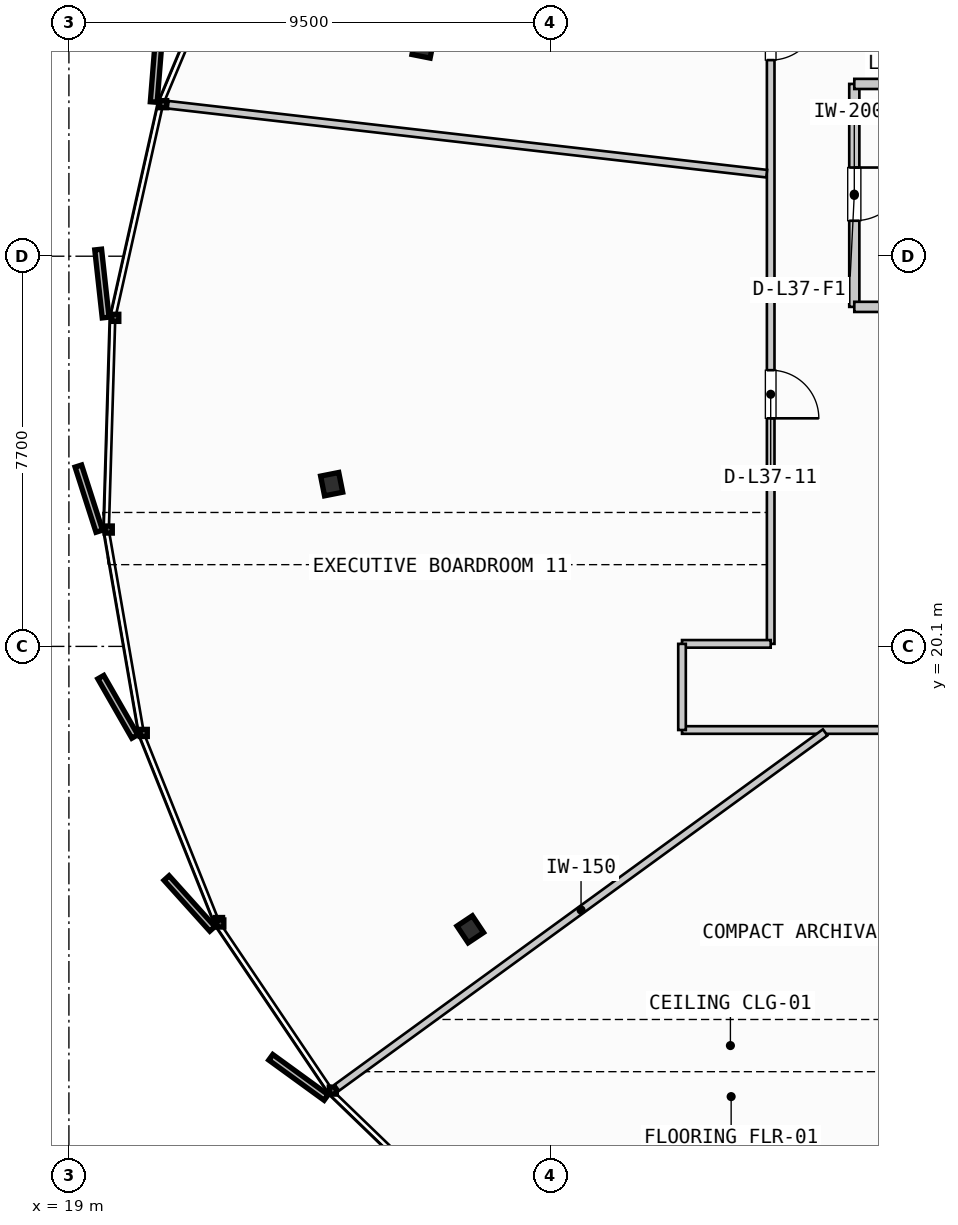
"""IFC4 building model, lengths in metres.
Left out: names, types, materials, properties, quantities, classifications, styles, units other than length and angle.
Written with IfcOpenShell. Run it as: python <this file> out.ifc"""

import sys

from ifc_helpers import new_model, si_unit, direction, frame, frame_2d, origin, origin_2d, place, context, subcontext, project, spatial, rectangle, i_section, extrude, source, transform, mapped, element, fill, save


model = new_model("IFC4")
c1 = context("Model", 3, precision=1e-05, world=origin(), true_north=direction((0.0, 1.0)))
c2 = subcontext(c1, "Body", "Model", "MODEL_VIEW")
j1 = project(units=[si_unit("LENGTHUNIT", "METRE"), si_unit("PLANEANGLEUNIT", "RADIAN")], contexts=[c1])
p1 = place(None, origin())
s1 = spatial("IfcSite", under=j1, at=p1, CompositionType="ELEMENT")
p2 = place(p1, origin())
s2 = spatial("IfcBuilding", under=s1, at=p2, CompositionType="ELEMENT")
p3 = place(p2, frame((0.0, 0.0, 146.55)))
s3 = spatial("IfcBuildingStorey", under=s2, at=p3, CompositionType="ELEMENT", Elevation=146.55)
m1 = source(origin(), c2, "Body", "SweptSolid", [
    extrude(i_section(OverallWidth=0.397, OverallDepth=0.365, WebThickness=0.028, FlangeThickness=0.044, FilletRadius=0.015, at=origin_2d()), origin(), (0.0, 0.0, 1.0), 3.3),
])
for number, where, z_axis, x_axis in (
    (1, (25.989, 31.94, 0.0), (0.0, 0.0, 1.0), (-0.981, 0.195, 0.0)),
    (2, (24.185, 23.302, 0.0), (0.0, 0.0, 1.0), (-0.981, -0.195, 0.0)),
    (3, (26.921, 14.517, 0.0), (0.0, 0.0, 1.0), (-0.831, -0.556, 0.0)),
):
    element("IfcColumn", number, at=place(p3, frame(where, z_axis=z_axis, x_axis=x_axis)), inside=s3, PredefinedType="COLUMN", context=c2, shape_type="MappedRepresentation", body=[
        mapped(m1, transform((0.0, 0.0, 0.0), scale=1.0)),
    ])
p4 = place(p3, frame((34.5, 31.2, 0.0), z_axis=(0.0, 0.0, 1.0), x_axis=(0.0, -1.0, 0.0)))
e4 = element("IfcWall", 4, at=p4, inside=s3, PredefinedType="PARTITIONING", context=c2, shape_type="SweptSolid", body=[
    extrude(rectangle(XDim=4.4, YDim=0.2, at=frame_2d((2.2, 0.0))), origin(), (0.0, 0.0, 1.0), 2.305),
])
p5 = place(p4, frame((1.65, 0.0, 0.0)))
e5 = element("IfcOpeningElement", 5, at=p5, cuts=e4, PredefinedType="OPENING", context=c2, shape_type="SweptSolid", body=[
    extrude(rectangle(XDim=1.05, YDim=2.15, at=frame_2d((0.525, 1.075))), frame((0.0, 0.11, 0.0), z_axis=(0.0, -1.0, 0.0), x_axis=(1.0, 0.0, 0.0)), (0.0, 0.0, 1.0), 0.22),
])
for number, where, z_axis, x_axis in (
    (6, (34.5, 26.8, 0.0), (0.0, 0.0, 1.0), (1.0, 0.0, 0.0)),
    (7, (34.5, 31.2, 0.0), (0.0, 0.0, 1.0), (1.0, 0.0, 0.0)),
):
    element("IfcWall", number, at=place(p3, frame(where, z_axis=z_axis, x_axis=x_axis)), inside=s3, PredefinedType="PARTITIONING", context=c2, shape_type="SweptSolid", body=[
        extrude(rectangle(XDim=3.215, YDim=0.2, at=frame_2d((1.607, 0.0))), origin(), (0.0, 0.0, 1.0), 2.305),
    ])
p6 = place(p3, frame((31.1, 18.45, 0.0), z_axis=(0.0, 0.0, 1.0), x_axis=(1.0, 0.0, 0.0)))
e8 = element("IfcWall", 8, at=p6, inside=s3, PredefinedType="PARTITIONING", context=c2, shape_type="SweptSolid", body=[
    extrude(rectangle(XDim=31.4, YDim=0.15, at=frame_2d((15.7, 0.0))), origin(), (0.0, 0.0, 1.0), 2.305),
])
p7 = place(p6, frame((6.281, 0.0, 0.0)))
e9 = element("IfcOpeningElement", 9, at=p7, cuts=e8, PredefinedType="OPENING", context=c2, shape_type="SweptSolid", body=[
    extrude(rectangle(XDim=0.95, YDim=2.15, at=frame_2d((0.475, 1.075))), frame((0.0, 0.085, 0.0), z_axis=(0.0, -1.0, 0.0), x_axis=(1.0, 0.0, 0.0)), (0.0, 0.0, 1.0), 0.17),
])
p8 = place(p6, frame((14.09, 0.0, 0.0)))
e10 = element("IfcOpeningElement", 10, at=p8, cuts=e8, PredefinedType="OPENING", context=c2, shape_type="SweptSolid", body=[
    extrude(rectangle(XDim=0.95, YDim=2.15, at=frame_2d((0.475, 1.075))), frame((0.0, 0.085, 0.0), z_axis=(0.0, -1.0, 0.0), x_axis=(1.0, 0.0, 0.0)), (0.0, 0.0, 1.0), 0.17),
])
p9 = place(p6, frame((22.674, 0.0, 0.0)))
e11 = element("IfcOpeningElement", 11, at=p9, cuts=e8, PredefinedType="OPENING", context=c2, shape_type="SweptSolid", body=[
    extrude(rectangle(XDim=0.95, YDim=2.15, at=frame_2d((0.475, 1.075))), frame((0.0, 0.085, 0.0), z_axis=(0.0, -1.0, 0.0), x_axis=(1.0, 0.0, 0.0)), (0.0, 0.0, 1.0), 0.17),
])
p10 = place(p3, frame((32.85, 35.45, 0.0), z_axis=(0.0, 0.0, 1.0), x_axis=(0.0, -1.0, 0.0)))
e12 = element("IfcWall", 12, at=p10, inside=s3, PredefinedType="PARTITIONING", context=c2, shape_type="SweptSolid", body=[
    extrude(rectangle(XDim=15.3, YDim=0.15, at=frame_2d((7.65, 0.0))), origin(), (0.0, 0.0, 1.0), 2.305),
])
p11 = place(p10, frame((2.83, 0.0, 0.0)))
e13 = element("IfcOpeningElement", 13, at=p11, cuts=e12, PredefinedType="OPENING", context=c2, shape_type="SweptSolid", body=[
    extrude(rectangle(XDim=0.95, YDim=2.15, at=frame_2d((0.475, 1.075))), frame((0.0, 0.085, 0.0), z_axis=(0.0, -1.0, 0.0), x_axis=(1.0, 0.0, 0.0)), (0.0, 0.0, 1.0), 0.17),
])
p12 = place(p10, frame((9.899, 0.0, 0.0)))
e14 = element("IfcOpeningElement", 14, at=p12, cuts=e12, PredefinedType="OPENING", context=c2, shape_type="SweptSolid", body=[
    extrude(rectangle(XDim=0.95, YDim=2.15, at=frame_2d((0.475, 1.075))), frame((0.0, 0.085, 0.0), z_axis=(0.0, -1.0, 0.0), x_axis=(1.0, 0.0, 0.0)), (0.0, 0.0, 1.0), 0.17),
])
p13 = place(p3, frame((32.85, 20.15, 0.0), z_axis=(0.0, 0.0, 1.0), x_axis=(-1.0, 0.0, 0.0)))
e15 = element("IfcWall", 15, at=p13, inside=s3, PredefinedType="PARTITIONING", context=c2, shape_type="SweptSolid", body=[
    extrude(rectangle(XDim=1.75, YDim=0.15, at=frame_2d((0.875, 0.0))), origin(), (0.0, 0.0, 1.0), 2.305),
])
p14 = place(p3, frame((31.1, 20.15, 0.0), z_axis=(0.0, 0.0, 1.0), x_axis=(0.0, -1.0, 0.0)))
e16 = element("IfcWall", 16, at=p14, inside=s3, PredefinedType="PARTITIONING", context=c2, shape_type="SweptSolid", body=[
    extrude(rectangle(XDim=1.7, YDim=0.15, at=frame_2d((0.85, 0.0))), origin(), (0.0, 0.0, 1.0), 2.305),
])
p15 = place(p3, frame((33.925, 18.403, 0.0), z_axis=(0.0, 0.0, 1.0), x_axis=(-0.808658108414, -0.588278899584, 0.0)))
e17 = element("IfcWall", 17, at=p15, inside=s3, PredefinedType="PARTITIONING", context=c2, shape_type="SweptSolid", body=[
    extrude(rectangle(XDim=11.916, YDim=0.15, at=frame_2d((5.958, 0.0))), origin(), (0.0, 0.0, 1.0), 2.305),
])
p16 = place(p3, frame((41.879, 18.379, 0.0), z_axis=(0.0, 0.0, 1.0), x_axis=(-0.464680296379, -0.885478527214, 0.0)))
e18 = element("IfcWall", 18, at=p16, inside=s3, PredefinedType="PARTITIONING", context=c2, shape_type="SweptSolid", body=[
    extrude(rectangle(XDim=15.389, YDim=0.15, at=frame_2d((7.694, 0.0))), origin(), (0.0, 0.0, 1.0), 2.305),
])
p17 = place(p3, frame((32.771, 29.429, 0.0), z_axis=(0.0, 0.0, 1.0), x_axis=(-0.993435617558, 0.114392629863, 0.0)))
e19 = element("IfcWall", 19, at=p17, inside=s3, PredefinedType="PARTITIONING", context=c2, shape_type="SweptSolid", body=[
    extrude(rectangle(XDim=11.89, YDim=0.15, at=frame_2d((5.945, 0.0))), origin(), (0.0, 0.0, 1.0), 2.305),
])
m2 = source(origin(), c2, "Body", "SweptSolid", [
    extrude(rectangle(XDim=1.05, YDim=2.15, at=frame_2d((0.525, 1.075))), frame((0.0, 0.025, 0.0), z_axis=(0.0, -1.0, 0.0), x_axis=(1.0, 0.0, 0.0)), (0.0, 0.0, 1.0), 0.05),
])
p18 = place(p5, origin())
e20 = element("IfcDoor", 20, at=p18, inside=s3, OperationType="SINGLE_SWING_LEFT", PredefinedType="DOOR", context=c2, shape_type="MappedRepresentation", body=[
    mapped(m2, transform((0.0, 0.0, 0.0), scale=1.0)),
])
fill(e5, e20)
m3 = source(origin(), c2, "Body", "SweptSolid", [
    extrude(rectangle(XDim=0.95, YDim=2.15, at=frame_2d((0.475, 1.075))), frame((0.0, 0.025, 0.0), z_axis=(0.0, -1.0, 0.0), x_axis=(1.0, 0.0, 0.0)), (0.0, 0.0, 1.0), 0.05),
])
p19 = place(p11, origin())
e21 = element("IfcDoor", 21, at=p19, inside=s3, OperationType="SINGLE_SWING_LEFT", PredefinedType="DOOR", context=c2, shape_type="MappedRepresentation", body=[
    mapped(m3, transform((0.0, 0.0, 0.0), scale=1.0)),
])
fill(e13, e21)
p20 = place(p12, origin())
e22 = element("IfcDoor", 22, at=p20, inside=s3, OperationType="SINGLE_SWING_RIGHT", PredefinedType="DOOR", context=c2, shape_type="MappedRepresentation", body=[
    mapped(m3, transform((0.0, 0.0, 0.0), scale=1.0)),
])
fill(e14, e22)
save(model, sys.argv[1])
